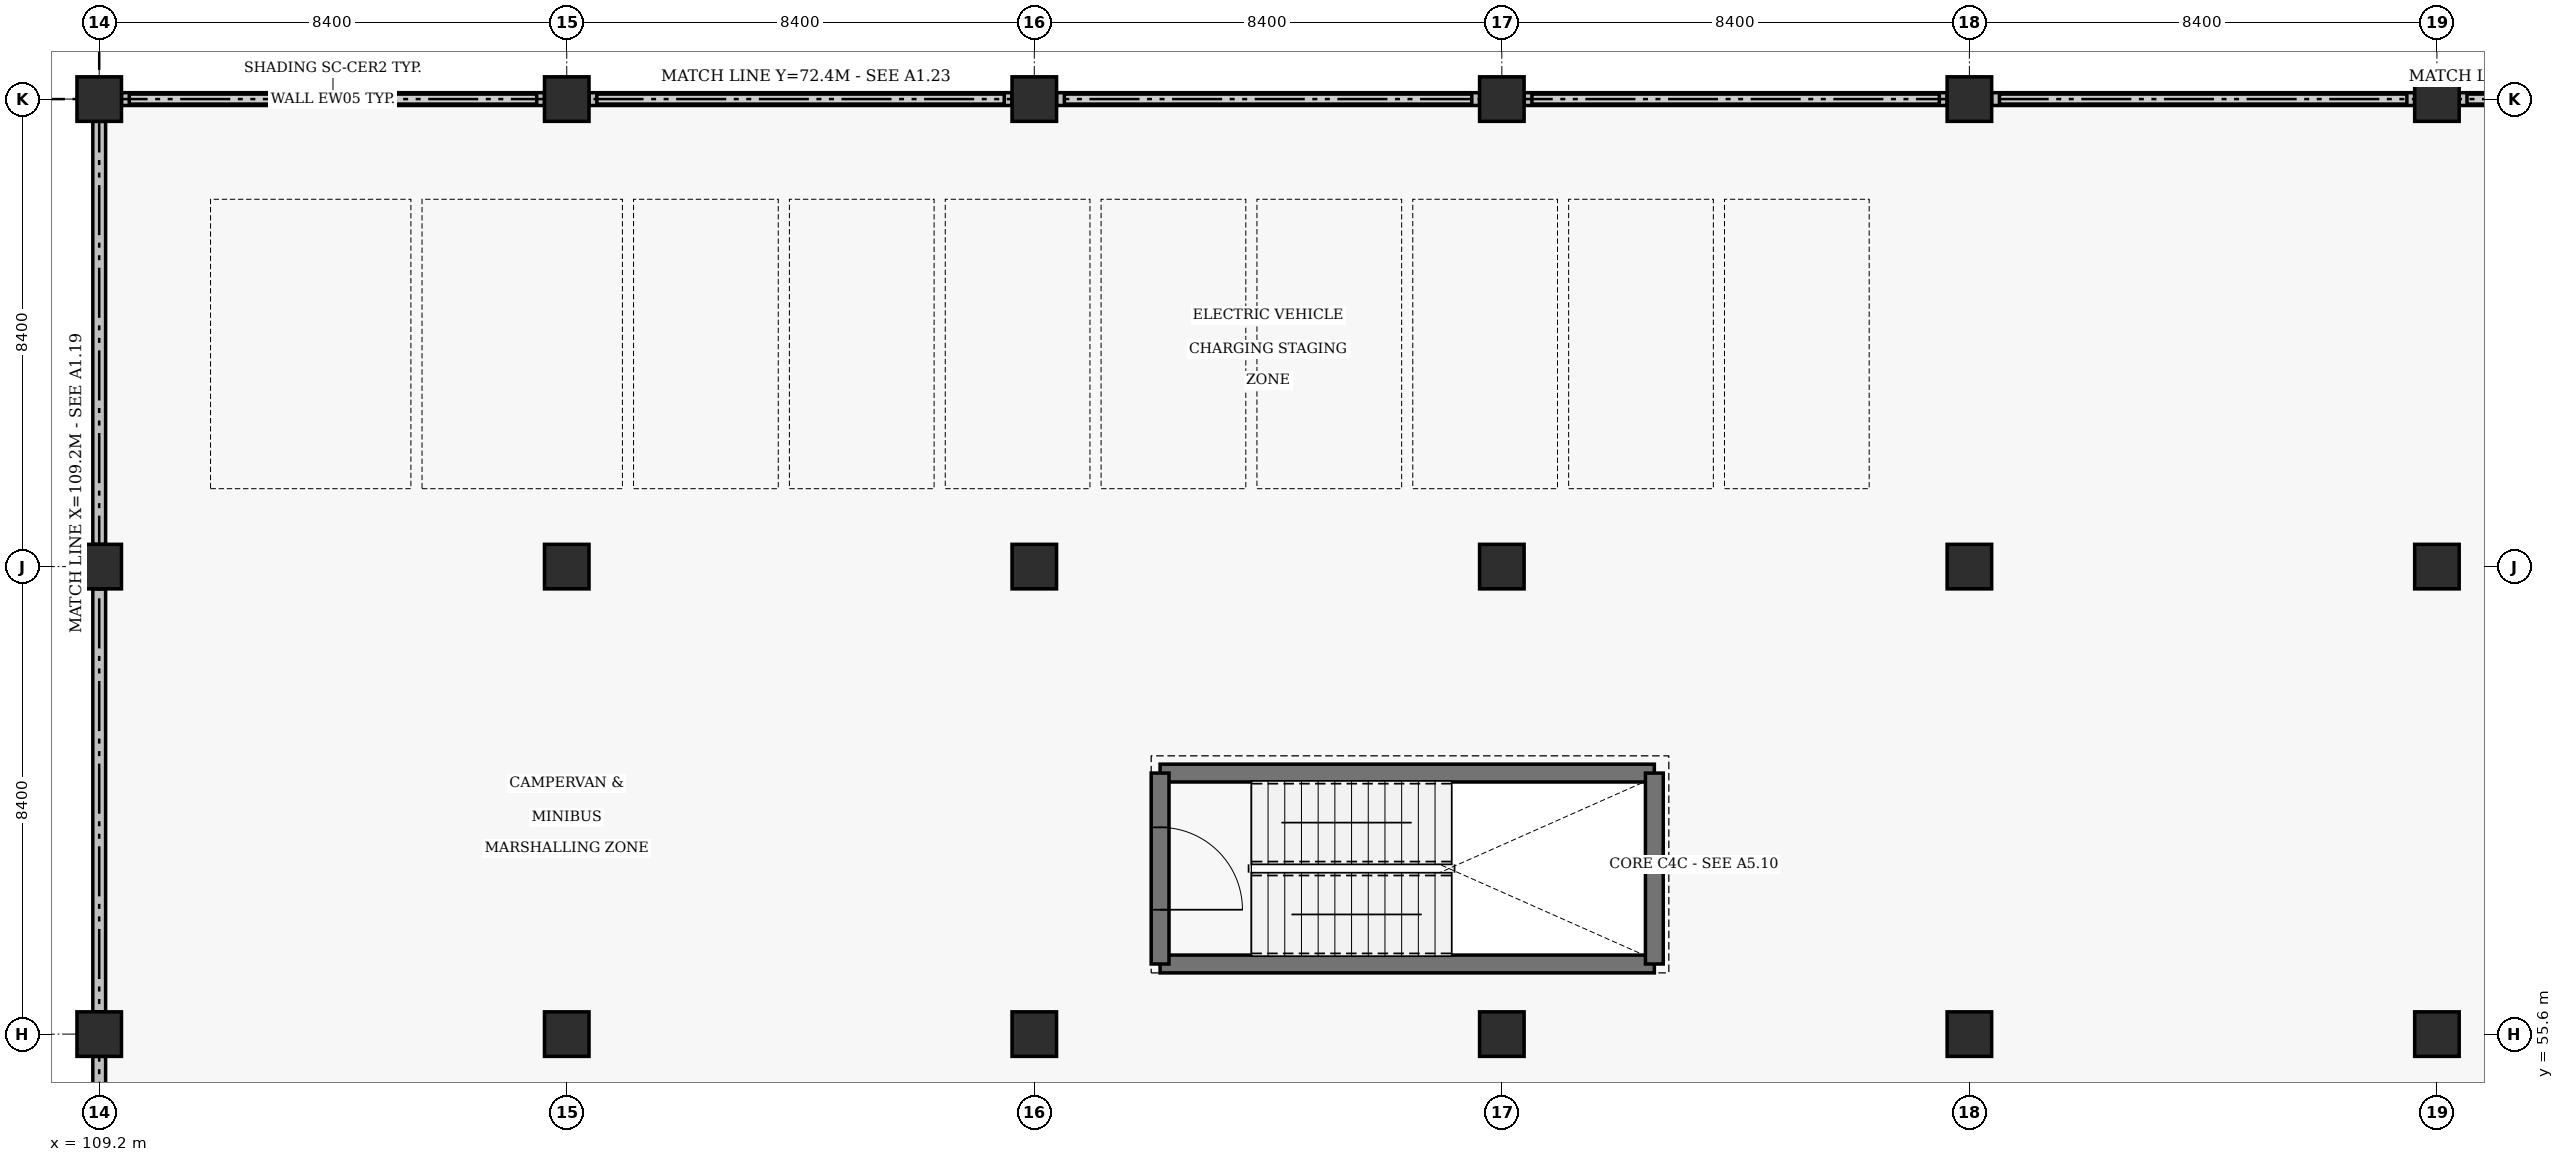
"""IFC4 building model, lengths in metres.
Left out: names, types, materials, properties, quantities, classifications, styles, units other than length and angle.
Written with IfcOpenShell. Run it as: python <this file> out.ifc"""

import sys

from ifc_helpers import new_model, si_unit, direction, frame, frame_2d, origin, origin_2d, place, context, subcontext, project, spatial, rectangle, extrude, element, fill, save


model = new_model("IFC4")
c1 = context("Model", 3, precision=1e-05, world=origin(), true_north=direction((0.0, 1.0)))
c2 = subcontext(c1, "Body", "Model", "MODEL_VIEW")
j1 = project(units=[si_unit("LENGTHUNIT", "METRE"), si_unit("PLANEANGLEUNIT", "RADIAN")], contexts=[c1])
p1 = place(None, origin())
s1 = spatial("IfcSite", under=j1, at=p1, CompositionType="ELEMENT")
p2 = place(p1, origin())
s2 = spatial("IfcBuilding", under=s1, at=p2, CompositionType="ELEMENT")
p3 = place(p2, frame((0.0, 0.0, 5.44)))
s3 = spatial("IfcBuildingStorey", under=s2, at=p3, CompositionType="ELEMENT", Elevation=5.44)
for number, where, z_axis, x_axis in (
    (1, (109.2, 55.6, 0.0), (0.0, 0.0, 1.0), (1.0, 0.0, 0.0)),
    (2, (109.2, 64.0, 0.0), (0.0, 0.0, 1.0), (1.0, 0.0, 0.0)),
    (3, (109.2, 72.4, 0.0), (0.0, 0.0, 1.0), (1.0, 0.0, 0.0)),
    (4, (117.6, 55.6, 0.0), (0.0, 0.0, 1.0), (1.0, 0.0, 0.0)),
    (5, (117.6, 64.0, 0.0), (0.0, 0.0, 1.0), (1.0, 0.0, 0.0)),
    (6, (117.6, 72.4, 0.0), (0.0, 0.0, 1.0), (1.0, 0.0, 0.0)),
    (7, (126.0, 55.6, 0.0), (0.0, 0.0, 1.0), (1.0, 0.0, 0.0)),
    (8, (126.0, 64.0, 0.0), (0.0, 0.0, 1.0), (1.0, 0.0, 0.0)),
    (9, (126.0, 72.4, 0.0), (0.0, 0.0, 1.0), (1.0, 0.0, 0.0)),
    (10, (134.4, 55.6, 0.0), (0.0, 0.0, 1.0), (1.0, 0.0, 0.0)),
    (11, (134.4, 64.0, 0.0), (0.0, 0.0, 1.0), (1.0, 0.0, 0.0)),
    (12, (134.4, 72.4, 0.0), (0.0, 0.0, 1.0), (1.0, 0.0, 0.0)),
    (13, (142.8, 55.6, 0.0), (0.0, 0.0, 1.0), (1.0, 0.0, 0.0)),
    (14, (142.8, 64.0, 0.0), (0.0, 0.0, 1.0), (1.0, 0.0, 0.0)),
    (15, (142.8, 72.4, 0.0), (0.0, 0.0, 1.0), (1.0, 0.0, 0.0)),
    (16, (151.2, 55.6, 0.0), (0.0, 0.0, 1.0), (1.0, 0.0, 0.0)),
    (17, (151.2, 64.0, 0.0), (0.0, 0.0, 1.0), (1.0, 0.0, 0.0)),
    (18, (151.2, 72.4, 0.0), (0.0, 0.0, 1.0), (1.0, 0.0, 0.0)),
):
    element("IfcColumn", number, at=place(p3, frame(where, z_axis=z_axis, x_axis=x_axis)), inside=s3, PredefinedType="COLUMN", context=c2, shape_type="SweptSolid", body=[
        extrude(rectangle(XDim=0.8, YDim=0.8, at=origin_2d()), origin(), (0.0, 0.0, 1.0), 4.16),
    ])
p4 = place(p3, frame((109.6, 72.4, 0.0), z_axis=(0.0, 0.0, 1.0), x_axis=(1.0, 0.0, 0.0)))
e19 = element("IfcWall", 19, at=p4, inside=s3, PredefinedType="PARAPET", context=c2, shape_type="SweptSolid", body=[
    extrude(rectangle(XDim=7.6, YDim=0.23, at=frame_2d((3.8, 0.0))), origin(), (0.0, 0.0, 1.0), 1.15),
])
for number, where, z_axis, x_axis in (
    (20, (118.0, 72.4, 0.0), (0.0, 0.0, 1.0), (1.0, 0.0, 0.0)),
    (21, (126.4, 72.4, 0.0), (0.0, 0.0, 1.0), (1.0, 0.0, 0.0)),
):
    element("IfcWall", number, at=place(p3, frame(where, z_axis=z_axis, x_axis=x_axis)), inside=s3, PredefinedType="PARAPET", context=c2, shape_type="SweptSolid", body=[
        extrude(rectangle(XDim=7.6, YDim=0.23, at=frame_2d((3.8, 0.0))), origin(), (0.0, 0.0, 1.0), 1.15),
    ])
p5 = place(p3, frame((134.8, 72.4, 0.0), z_axis=(0.0, 0.0, 1.0), x_axis=(1.0, 0.0, 0.0)))
e22 = element("IfcWall", 22, at=p5, inside=s3, PredefinedType="PARAPET", context=c2, shape_type="SweptSolid", body=[
    extrude(rectangle(XDim=7.6, YDim=0.23, at=frame_2d((3.8, 0.0))), origin(), (0.0, 0.0, 1.0), 1.15),
])
p6 = place(p3, frame((143.2, 72.4, 0.0), z_axis=(0.0, 0.0, 1.0), x_axis=(1.0, 0.0, 0.0)))
e23 = element("IfcWall", 23, at=p6, inside=s3, PredefinedType="PARAPET", context=c2, shape_type="SweptSolid", body=[
    extrude(rectangle(XDim=7.6, YDim=0.23, at=frame_2d((3.8, 0.0))), origin(), (0.0, 0.0, 1.0), 1.15),
])
for number, where, z_axis, x_axis in (
    (24, (151.6, 72.4, 0.0), (0.0, 0.0, 1.0), (1.0, 0.0, 0.0)),
    (25, (109.2, 47.6, 0.0), (0.0, 0.0, 1.0), (0.0, 1.0, 0.0)),
):
    element("IfcWall", number, at=place(p3, frame(where, z_axis=z_axis, x_axis=x_axis)), inside=s3, PredefinedType="PARAPET", context=c2, shape_type="SweptSolid", body=[
        extrude(rectangle(XDim=7.6, YDim=0.23, at=frame_2d((3.8, 0.0))), origin(), (0.0, 0.0, 1.0), 1.15),
    ])
for number, where, z_axis, x_axis in (
    (26, (109.2, 56.0, 0.0), (0.0, 0.0, 1.0), (0.0, 1.0, 0.0)),
    (27, (109.2, 64.4, 0.0), (0.0, 0.0, 1.0), (0.0, 1.0, 0.0)),
):
    element("IfcWall", number, at=place(p3, frame(where, z_axis=z_axis, x_axis=x_axis)), inside=s3, PredefinedType="PARAPET", context=c2, shape_type="SweptSolid", body=[
        extrude(rectangle(XDim=7.6, YDim=0.23, at=frame_2d((3.8, 0.0))), origin(), (0.0, 0.0, 1.0), 1.15),
    ])
for number, where, z_axis, x_axis in (
    (28, (128.26, 56.86, 0.0), (0.0, 0.0, 1.0), (1.0, 0.0, 0.0)),
    (29, (128.26, 60.29, 0.0), (0.0, 0.0, 1.0), (1.0, 0.0, 0.0)),
):
    element("IfcWall", number, at=place(p3, frame(where, z_axis=z_axis, x_axis=x_axis)), inside=s3, PredefinedType="SHEAR", context=c2, shape_type="SweptSolid", body=[
        extrude(rectangle(XDim=8.88, YDim=0.32, at=frame_2d((4.44, 0.0))), origin(), (0.0, 0.0, 1.0), 4.16),
    ])
p7 = place(p3, frame((128.26, 60.29, 0.0), z_axis=(0.0, 0.0, 1.0), x_axis=(0.0, -1.0, 0.0)))
e30 = element("IfcWall", 30, at=p7, inside=s3, PredefinedType="SHEAR", context=c2, shape_type="SweptSolid", body=[
    extrude(rectangle(XDim=3.43, YDim=0.32, at=frame_2d((1.715, 0.0))), origin(), (0.0, 0.0, 1.0), 4.16),
])
p8 = place(p7, frame((0.975, 0.0, 0.0)))
e31 = element("IfcOpeningElement", 31, at=p8, cuts=e30, PredefinedType="OPENING", context=c2, shape_type="SweptSolid", body=[
    extrude(rectangle(XDim=1.48, YDim=2.15, at=frame_2d((0.74, 1.075))), frame((0.0, 0.17, 0.0), z_axis=(0.0, -1.0, 0.0), x_axis=(1.0, 0.0, 0.0)), (0.0, 0.0, 1.0), 0.34),
])
p9 = place(p3, frame((137.14, 56.86, 0.0), z_axis=(0.0, 0.0, 1.0), x_axis=(0.0, 1.0, 0.0)))
e32 = element("IfcWall", 32, at=p9, inside=s3, PredefinedType="SHEAR", context=c2, shape_type="SweptSolid", body=[
    extrude(rectangle(XDim=3.43, YDim=0.32, at=frame_2d((1.715, 0.0))), origin(), (0.0, 0.0, 1.0), 4.16),
])
p10 = place(p8, origin())
e33 = element("IfcDoor", 33, at=p10, inside=s3, OperationType="SINGLE_SWING_RIGHT", PredefinedType="DOOR", context=c2, shape_type="SweptSolid", body=[
    extrude(rectangle(XDim=1.48, YDim=2.15, at=frame_2d((0.74, 1.075))), frame((0.0, 0.025, 0.0), z_axis=(0.0, -1.0, 0.0), x_axis=(1.0, 0.0, 0.0)), (0.0, 0.0, 1.0), 0.05),
])
fill(e31, e33)
save(model, sys.argv[1])
